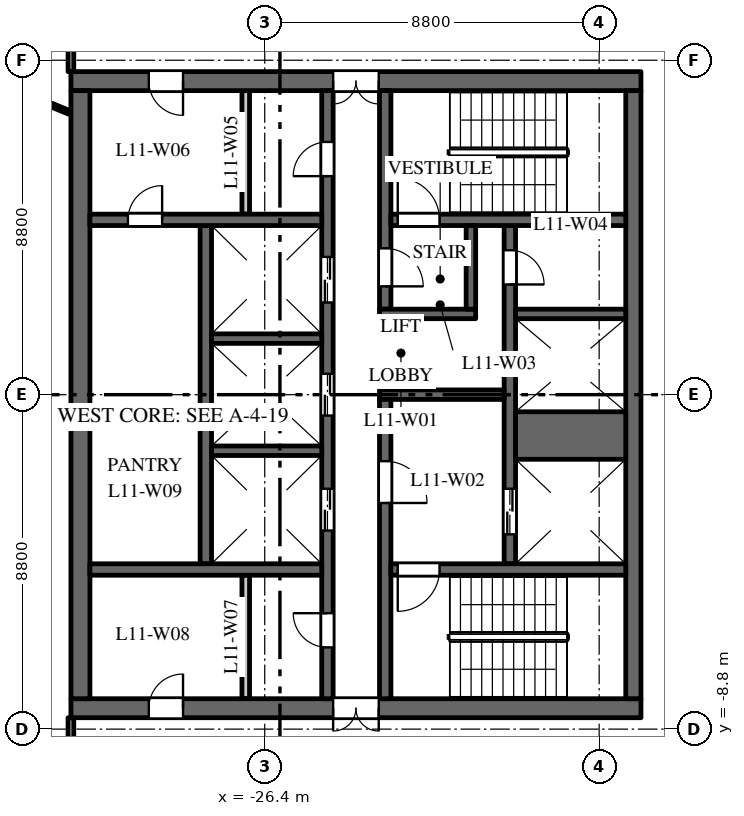
"""IFC4 building model, lengths in metres.
Left out: names, types, materials, properties, quantities, classifications, styles, units other than length and angle.
Written with IfcOpenShell. Run it as: python <this file> out.ifc"""

import sys

from ifc_helpers import new_model, si_unit, direction, frame, frame_2d, origin, place, context, subcontext, project, spatial, rectangle, extrude, element, fill, save


model = new_model("IFC4")
c1 = context("Model", 3, precision=1e-05, world=origin(), true_north=direction((0.0, 1.0)))
c2 = subcontext(c1, "Body", "Model", "MODEL_VIEW")
j1 = project(units=[si_unit("LENGTHUNIT", "METRE"), si_unit("PLANEANGLEUNIT", "RADIAN")], contexts=[c1])
p1 = place(None, origin())
s1 = spatial("IfcSite", under=j1, at=p1, CompositionType="ELEMENT")
p2 = place(p1, origin())
s2 = spatial("IfcBuilding", under=s1, at=p2, CompositionType="ELEMENT")
p3 = place(p2, frame((0.0, 0.0, 54.5)))
s3 = spatial("IfcBuildingStorey", under=s2, at=p3, CompositionType="ELEMENT", Elevation=54.5)
p4 = place(p3, frame((-16.5, 8.25, 0.0), z_axis=(0.0, 0.0, 1.0), x_axis=(-1.0, 0.0, 0.0)))
e1 = element("IfcWall", 1, at=p4, inside=s3, PredefinedType="SHEAR", context=c2, shape_type="SweptSolid", body=[
    extrude(rectangle(XDim=15.0, YDim=0.5, at=frame_2d((7.5, 0.0))), origin(), (0.0, 0.0, 1.0), 3.7),
])
p5 = place(p4, frame((6.9, 0.0, 0.0)))
e2 = element("IfcOpeningElement", 2, at=p5, cuts=e1, PredefinedType="OPENING", context=c2, shape_type="SweptSolid", body=[
    extrude(rectangle(XDim=1.2, YDim=2.1, at=frame_2d((0.6, 1.05))), frame((0.0, 0.26, 0.0), z_axis=(0.0, -1.0, 0.0), x_axis=(1.0, 0.0, 0.0)), (0.0, 0.0, 1.0), 0.52),
])
p6 = place(p4, frame((12.05, 0.0, 0.0)))
e3 = element("IfcOpeningElement", 3, at=p6, cuts=e1, PredefinedType="OPENING", context=c2, shape_type="SweptSolid", body=[
    extrude(rectangle(XDim=0.9, YDim=2.1, at=frame_2d((0.45, 1.05))), frame((0.0, 0.26, 0.0), z_axis=(0.0, -1.0, 0.0), x_axis=(1.0, 0.0, 0.0)), (0.0, 0.0, 1.0), 0.52),
])
p7 = place(p3, frame((-16.5, -8.25, 0.0), z_axis=(0.0, 0.0, 1.0), x_axis=(-1.0, 0.0, 0.0)))
e4 = element("IfcWall", 4, at=p7, inside=s3, PredefinedType="SHEAR", context=c2, shape_type="SweptSolid", body=[
    extrude(rectangle(XDim=15.0, YDim=0.5, at=frame_2d((7.5, 0.0))), origin(), (0.0, 0.0, 1.0), 3.7),
])
p8 = place(p7, frame((6.9, 0.0, 0.0)))
e5 = element("IfcOpeningElement", 5, at=p8, cuts=e4, PredefinedType="OPENING", context=c2, shape_type="SweptSolid", body=[
    extrude(rectangle(XDim=1.2, YDim=2.1, at=frame_2d((0.6, 1.05))), frame((0.0, 0.26, 0.0), z_axis=(0.0, -1.0, 0.0), x_axis=(1.0, 0.0, 0.0)), (0.0, 0.0, 1.0), 0.52),
])
p9 = place(p7, frame((12.05, 0.0, 0.0)))
e6 = element("IfcOpeningElement", 6, at=p9, cuts=e4, PredefinedType="OPENING", context=c2, shape_type="SweptSolid", body=[
    extrude(rectangle(XDim=0.9, YDim=2.1, at=frame_2d((0.45, 1.05))), frame((0.0, 0.26, 0.0), z_axis=(0.0, -1.0, 0.0), x_axis=(1.0, 0.0, 0.0)), (0.0, 0.0, 1.0), 0.52),
])
p10 = place(p3, frame((-27.95, -4.45, 0.0), z_axis=(0.0, 0.0, 1.0), x_axis=(0.0, 1.0, 0.0)))
e7 = element("IfcWall", 7, at=p10, inside=s3, PredefinedType="SHEAR", context=c2, shape_type="SweptSolid", body=[
    extrude(rectangle(XDim=8.9, YDim=0.3, at=frame_2d((4.45, 0.0))), origin(), (0.0, 0.0, 1.0), 3.7),
])
p11 = place(p3, frame((-19.95, -4.45, 0.0), z_axis=(0.0, 0.0, 1.0), x_axis=(0.0, 1.0, 0.0)))
e8 = element("IfcWall", 8, at=p11, inside=s3, PredefinedType="SHEAR", context=c2, shape_type="SweptSolid", body=[
    extrude(rectangle(XDim=8.9, YDim=0.3, at=frame_2d((4.45, 0.0))), origin(), (0.0, 0.0, 1.0), 3.7),
])
p12 = place(p11, frame((0.775, 0.0, 0.0)))
e9 = element("IfcOpeningElement", 9, at=p12, cuts=e8, PredefinedType="OPENING", context=c2, shape_type="SweptSolid", body=[
    extrude(rectangle(XDim=1.2, YDim=2.1, at=frame_2d((0.6, 1.05))), frame((0.0, 0.16, 0.0), z_axis=(0.0, -1.0, 0.0), x_axis=(1.0, 0.0, 0.0)), (0.0, 0.0, 1.0), 0.32),
])
p13 = place(p11, frame((7.35, 0.0, 0.0)))
e10 = element("IfcOpeningElement", 10, at=p13, cuts=e8, PredefinedType="OPENING", context=c2, shape_type="SweptSolid", body=[
    extrude(rectangle(XDim=0.9, YDim=2.1, at=frame_2d((0.45, 1.05))), frame((0.0, 0.16, 0.0), z_axis=(0.0, -1.0, 0.0), x_axis=(1.0, 0.0, 0.0)), (0.0, 0.0, 1.0), 0.32),
])
p14 = place(p3, frame((-24.75, -8.0, 0.0), z_axis=(0.0, 0.0, 1.0), x_axis=(0.0, 1.0, 0.0)))
e11 = element("IfcWall", 11, at=p14, inside=s3, PredefinedType="SHEAR", context=c2, shape_type="SweptSolid", body=[
    extrude(rectangle(XDim=16.0, YDim=0.3, at=frame_2d((8.0, 0.0))), origin(), (0.0, 0.0, 1.0), 3.7),
])
p15 = place(p14, frame((4.425, 0.0, 0.0)))
e12 = element("IfcOpeningElement", 12, at=p15, cuts=e11, PredefinedType="OPENING", context=c2, shape_type="SweptSolid", body=[
    extrude(rectangle(XDim=1.1, YDim=2.1, at=frame_2d((0.55, 1.05))), frame((0.0, 0.16, 0.0), z_axis=(0.0, -1.0, 0.0), x_axis=(1.0, 0.0, 0.0)), (0.0, 0.0, 1.0), 0.32),
])
p16 = place(p14, frame((7.45, 0.0, 0.0)))
e13 = element("IfcOpeningElement", 13, at=p16, cuts=e11, PredefinedType="OPENING", context=c2, shape_type="SweptSolid", body=[
    extrude(rectangle(XDim=1.1, YDim=2.1, at=frame_2d((0.55, 1.05))), frame((0.0, 0.16, 0.0), z_axis=(0.0, -1.0, 0.0), x_axis=(1.0, 0.0, 0.0)), (0.0, 0.0, 1.0), 0.32),
])
p17 = place(p14, frame((10.425, 0.0, 0.0)))
e14 = element("IfcOpeningElement", 14, at=p17, cuts=e11, PredefinedType="OPENING", context=c2, shape_type="SweptSolid", body=[
    extrude(rectangle(XDim=1.2, YDim=2.1, at=frame_2d((0.6, 1.05))), frame((0.0, 0.16, 0.0), z_axis=(0.0, -1.0, 0.0), x_axis=(1.0, 0.0, 0.0)), (0.0, 0.0, 1.0), 0.32),
])
p18 = place(p14, frame((13.75, 0.0, 0.0)))
e15 = element("IfcOpeningElement", 15, at=p18, cuts=e11, PredefinedType="OPENING", context=c2, shape_type="SweptSolid", body=[
    extrude(rectangle(XDim=0.9, YDim=2.1, at=frame_2d((0.45, 1.05))), frame((0.0, 0.16, 0.0), z_axis=(0.0, -1.0, 0.0), x_axis=(1.0, 0.0, 0.0)), (0.0, 0.0, 1.0), 0.32),
])
p19 = place(p14, frame((1.35, 0.0, 0.0)))
e16 = element("IfcOpeningElement", 16, at=p19, cuts=e11, PredefinedType="OPENING", context=c2, shape_type="SweptSolid", body=[
    extrude(rectangle(XDim=0.9, YDim=2.1, at=frame_2d((0.45, 1.05))), frame((0.0, 0.16, 0.0), z_axis=(0.0, -1.0, 0.0), x_axis=(1.0, 0.0, 0.0)), (0.0, 0.0, 1.0), 0.32),
])
p20 = place(p3, frame((-20.1, 0.0, 0.0), z_axis=(0.0, 0.0, 1.0), x_axis=(-1.0, 0.0, 0.0)))
e17 = element("IfcWall", 17, at=p20, inside=s3, PredefinedType="SHEAR", context=c2, shape_type="SweptSolid", body=[
    extrude(rectangle(XDim=3.28, YDim=0.25, at=frame_2d((1.64, 0.0))), origin(), (0.0, 0.0, 1.0), 3.7),
])
p21 = place(p3, frame((-16.7, -8.0, 0.0), z_axis=(0.0, 0.0, 1.0), x_axis=(0.0, 1.0, 0.0)))
e18 = element("IfcWall", 18, at=p21, inside=s3, PredefinedType="SHEAR", context=c2, shape_type="SweptSolid", body=[
    extrude(rectangle(XDim=16.0, YDim=0.4, at=frame_2d((8.0, 0.0))), origin(), (0.0, 0.0, 1.0), 3.7),
])
p22 = place(p3, frame((-31.25, -8.0, 0.0), z_axis=(0.0, 0.0, 1.0), x_axis=(0.0, 1.0, 0.0)))
e19 = element("IfcWall", 19, at=p22, inside=s3, PredefinedType="SHEAR", context=c2, shape_type="SweptSolid", body=[
    extrude(rectangle(XDim=16.0, YDim=0.5, at=frame_2d((8.0, 0.0))), origin(), (0.0, 0.0, 1.0), 3.7),
])
p23 = place(p3, frame((-24.9, 4.6, 0.0), z_axis=(0.0, 0.0, 1.0), x_axis=(-1.0, 0.0, 0.0)))
e20 = element("IfcWall", 20, at=p23, inside=s3, PredefinedType="SHEAR", context=c2, shape_type="SweptSolid", body=[
    extrude(rectangle(XDim=6.1, YDim=0.3, at=frame_2d((3.05, 0.0))), origin(), (0.0, 0.0, 1.0), 3.7),
])
p24 = place(p23, frame((4.2, 0.0, 0.0)))
e21 = element("IfcOpeningElement", 21, at=p24, cuts=e20, PredefinedType="OPENING", context=c2, shape_type="SweptSolid", body=[
    extrude(rectangle(XDim=0.9, YDim=2.1, at=frame_2d((0.45, 1.05))), frame((0.0, 0.16, 0.0), z_axis=(0.0, -1.0, 0.0), x_axis=(1.0, 0.0, 0.0)), (0.0, 0.0, 1.0), 0.32),
])
for number, where, z_axis, x_axis in (
    (22, (-26.9, 4.75, 0.0), (0.0, 0.0, 1.0), (0.0, 1.0, 0.0)),
    (23, (-26.9, -8.0, 0.0), (0.0, 0.0, 1.0), (0.0, 1.0, 0.0)),
):
    element("IfcWall", number, at=place(p3, frame(where, z_axis=z_axis, x_axis=x_axis)), inside=s3, PredefinedType="PARTITIONING", context=c2, shape_type="SweptSolid", body=[
        extrude(rectangle(XDim=3.25, YDim=0.2, at=frame_2d((1.625, 0.0))), origin(), (0.0, 0.0, 1.0), 3.7),
    ])
p25 = place(p3, frame((-24.9, -4.6, 0.0), z_axis=(0.0, 0.0, 1.0), x_axis=(-1.0, 0.0, 0.0)))
e24 = element("IfcWall", 24, at=p25, inside=s3, PredefinedType="SHEAR", context=c2, shape_type="SweptSolid", body=[
    extrude(rectangle(XDim=6.1, YDim=0.3, at=frame_2d((3.05, 0.0))), origin(), (0.0, 0.0, 1.0), 3.7),
])
p26 = place(p3, frame((-16.9, -1.075, 0.0), z_axis=(0.0, 0.0, 1.0), x_axis=(-1.0, 0.0, 0.0)))
e25 = element("IfcWall", 25, at=p26, inside=s3, PredefinedType="SHEAR", context=c2, shape_type="SweptSolid", body=[
    extrude(rectangle(XDim=2.9, YDim=1.25, at=frame_2d((1.45, 0.0))), origin(), (0.0, 0.0, 1.0), 3.7),
])
for number, where, z_axis, x_axis in (
    (26, (-16.9, 2.125, 0.0), (0.0, 0.0, 1.0), (-1.0, 0.0, 0.0)),
    (27, (-24.9, -1.475, 0.0), (0.0, 0.0, 1.0), (-1.0, 0.0, 0.0)),
    (28, (-24.9, 1.475, 0.0), (0.0, 0.0, 1.0), (-1.0, 0.0, 0.0)),
):
    element("IfcWall", number, at=place(p3, frame(where, z_axis=z_axis, x_axis=x_axis)), inside=s3, PredefinedType="SHEAR", context=c2, shape_type="SweptSolid", body=[
        extrude(rectangle(XDim=2.9, YDim=0.25, at=frame_2d((1.45, 0.0))), origin(), (0.0, 0.0, 1.0), 3.7),
    ])
p27 = place(p3, frame((-23.23, 2.25, 0.0), z_axis=(0.0, 0.0, 1.0), x_axis=(0.0, 1.0, 0.0)))
e29 = element("IfcWall", 29, at=p27, inside=s3, PredefinedType="SHEAR", context=c2, shape_type="SweptSolid", body=[
    extrude(rectangle(XDim=5.75, YDim=0.3, at=frame_2d((2.875, 0.0))), origin(), (0.0, 0.0, 1.0), 3.7),
])
p28 = place(p27, frame((0.6, 0.0, 0.0)))
e30 = element("IfcOpeningElement", 30, at=p28, cuts=e29, PredefinedType="OPENING", context=c2, shape_type="SweptSolid", body=[
    extrude(rectangle(XDim=1.0, YDim=2.1, at=frame_2d((0.5, 1.05))), frame((0.0, 0.16, 0.0), z_axis=(0.0, -1.0, 0.0), x_axis=(1.0, 0.0, 0.0)), (0.0, 0.0, 1.0), 0.32),
])
p29 = place(p3, frame((-23.23, -8.0, 0.0), z_axis=(0.0, 0.0, 1.0), x_axis=(0.0, 1.0, 0.0)))
e31 = element("IfcWall", 31, at=p29, inside=s3, PredefinedType="SHEAR", context=c2, shape_type="SweptSolid", body=[
    extrude(rectangle(XDim=7.875, YDim=0.3, at=frame_2d((3.938, 0.0))), origin(), (0.0, 0.0, 1.0), 3.7),
])
p30 = place(p29, frame((5.15, 0.0, 0.0)))
e32 = element("IfcOpeningElement", 32, at=p30, cuts=e31, PredefinedType="OPENING", context=c2, shape_type="SweptSolid", body=[
    extrude(rectangle(XDim=1.1, YDim=2.1, at=frame_2d((0.55, 1.05))), frame((0.0, 0.16, 0.0), z_axis=(0.0, -1.0, 0.0), x_axis=(1.0, 0.0, 0.0)), (0.0, 0.0, 1.0), 0.32),
])
p31 = place(p3, frame((-16.9, 4.6, 0.0), z_axis=(0.0, 0.0, 1.0), x_axis=(-1.0, 0.0, 0.0)))
e33 = element("IfcWall", 33, at=p31, inside=s3, PredefinedType="SHEAR", context=c2, shape_type="SweptSolid", body=[
    extrude(rectangle(XDim=6.18, YDim=0.3, at=frame_2d((3.09, 0.0))), origin(), (0.0, 0.0, 1.0), 3.7),
])
p32 = place(p31, frame((4.9, 0.0, 0.0)))
e34 = element("IfcOpeningElement", 34, at=p32, cuts=e33, PredefinedType="OPENING", context=c2, shape_type="SweptSolid", body=[
    extrude(rectangle(XDim=1.1, YDim=2.1, at=frame_2d((0.55, 1.05))), frame((0.0, 0.16, 0.0), z_axis=(0.0, -1.0, 0.0), x_axis=(1.0, 0.0, 0.0)), (0.0, 0.0, 1.0), 0.32),
])
p33 = place(p3, frame((-16.9, -4.6, 0.0), z_axis=(0.0, 0.0, 1.0), x_axis=(-1.0, 0.0, 0.0)))
e35 = element("IfcWall", 35, at=p33, inside=s3, PredefinedType="SHEAR", context=c2, shape_type="SweptSolid", body=[
    extrude(rectangle(XDim=6.18, YDim=0.3, at=frame_2d((3.09, 0.0))), origin(), (0.0, 0.0, 1.0), 3.7),
])
p34 = place(p33, frame((4.9, 0.0, 0.0)))
e36 = element("IfcOpeningElement", 36, at=p34, cuts=e35, PredefinedType="OPENING", context=c2, shape_type="SweptSolid", body=[
    extrude(rectangle(XDim=1.1, YDim=2.1, at=frame_2d((0.55, 1.05))), frame((0.0, 0.16, 0.0), z_axis=(0.0, -1.0, 0.0), x_axis=(1.0, 0.0, 0.0)), (0.0, 0.0, 1.0), 0.32),
])
p35 = place(p3, frame((-20.85, 2.125, 0.0), z_axis=(0.0, 0.0, 1.0), x_axis=(-1.0, 0.0, 0.0)))
e37 = element("IfcWall", 37, at=p35, inside=s3, PredefinedType="SHEAR", context=c2, shape_type="SweptSolid", body=[
    extrude(rectangle(XDim=2.53, YDim=0.25, at=frame_2d((1.265, 0.0))), origin(), (0.0, 0.0, 1.0), 3.7),
])
p36 = place(p3, frame((-20.975, 2.25, 0.0), z_axis=(0.0, 0.0, 1.0), x_axis=(0.0, 1.0, 0.0)))
e38 = element("IfcWall", 38, at=p36, inside=s3, PredefinedType="SHEAR", context=c2, shape_type="SweptSolid", body=[
    extrude(rectangle(XDim=2.2, YDim=0.25, at=frame_2d((1.1, 0.0))), origin(), (0.0, 0.0, 1.0), 3.7),
])
p37 = place(p3, frame((-34.234, 8.53, 0.0), z_axis=(0.0, 0.0, 1.0), x_axis=(0.925344112436, -0.379128307542, 0.0)))
e39 = element("IfcWall", 39, at=p37, inside=s3, PredefinedType="PARTITIONING", context=c2, shape_type="SweptSolid", body=[
    extrude(rectangle(XDim=2.954, YDim=0.1, at=frame_2d((1.477, 0.0))), origin(), (0.0, 0.0, 1.0), 2.85),
])
for number, where, z_axis, x_axis in (
    (40, (-31.5, -10.7, 0.0), (0.0, 0.0, 1.0), (0.0, 1.0, 0.0)),
    (41, (-31.5, 8.5, 0.0), (0.0, 0.0, 1.0), (0.0, 1.0, 0.0)),
):
    element("IfcWall", number, at=place(p3, frame(where, z_axis=z_axis, x_axis=x_axis)), inside=s3, PredefinedType="PARTITIONING", context=c2, shape_type="SweptSolid", body=[
        extrude(rectangle(XDim=2.2, YDim=0.15, at=frame_2d((1.1, 0.0))), origin(), (0.0, 0.0, 1.0), 3.7),
    ])
p38 = place(p12, origin())
e42 = element("IfcDoor", 42, at=p38, inside=s3, OperationType="DOUBLE_DOOR_SLIDING", PredefinedType="DOOR", context=c2, shape_type="SweptSolid", body=[
    extrude(rectangle(XDim=1.2, YDim=2.1, at=frame_2d((0.6, 1.05))), frame((0.0, 0.025, 0.0), z_axis=(0.0, -1.0, 0.0), x_axis=(1.0, 0.0, 0.0)), (0.0, 0.0, 1.0), 0.05),
])
fill(e9, e42)
p39 = place(p15, origin())
e43 = element("IfcDoor", 43, at=p39, inside=s3, OperationType="DOUBLE_DOOR_SLIDING", PredefinedType="DOOR", context=c2, shape_type="SweptSolid", body=[
    extrude(rectangle(XDim=1.1, YDim=2.1, at=frame_2d((0.55, 1.05))), frame((0.0, 0.025, 0.0), z_axis=(0.0, -1.0, 0.0), x_axis=(1.0, 0.0, 0.0)), (0.0, 0.0, 1.0), 0.05),
])
fill(e12, e43)
p40 = place(p16, origin())
e44 = element("IfcDoor", 44, at=p40, inside=s3, OperationType="DOUBLE_DOOR_SLIDING", PredefinedType="DOOR", context=c2, shape_type="SweptSolid", body=[
    extrude(rectangle(XDim=1.1, YDim=2.1, at=frame_2d((0.55, 1.05))), frame((0.0, 0.025, 0.0), z_axis=(0.0, -1.0, 0.0), x_axis=(1.0, 0.0, 0.0)), (0.0, 0.0, 1.0), 0.05),
])
fill(e13, e44)
p41 = place(p17, origin())
e45 = element("IfcDoor", 45, at=p41, inside=s3, OperationType="DOUBLE_DOOR_SLIDING", PredefinedType="DOOR", context=c2, shape_type="SweptSolid", body=[
    extrude(rectangle(XDim=1.2, YDim=2.1, at=frame_2d((0.6, 1.05))), frame((0.0, 0.025, 0.0), z_axis=(0.0, -1.0, 0.0), x_axis=(1.0, 0.0, 0.0)), (0.0, 0.0, 1.0), 0.05),
])
fill(e14, e45)
p42 = place(p32, origin())
e46 = element("IfcDoor", 46, at=p42, inside=s3, OperationType="SINGLE_SWING_RIGHT", PredefinedType="DOOR", context=c2, shape_type="SweptSolid", body=[
    extrude(rectangle(XDim=1.1, YDim=2.1, at=frame_2d((0.55, 1.05))), frame((0.0, 0.025, 0.0), z_axis=(0.0, -1.0, 0.0), x_axis=(1.0, 0.0, 0.0)), (0.0, 0.0, 1.0), 0.05),
])
fill(e34, e46)
p43 = place(p34, origin())
e47 = element("IfcDoor", 47, at=p43, inside=s3, OperationType="SINGLE_SWING_LEFT", PredefinedType="DOOR", context=c2, shape_type="SweptSolid", body=[
    extrude(rectangle(XDim=1.1, YDim=2.1, at=frame_2d((0.55, 1.05))), frame((0.0, 0.025, 0.0), z_axis=(0.0, -1.0, 0.0), x_axis=(1.0, 0.0, 0.0)), (0.0, 0.0, 1.0), 0.05),
])
fill(e36, e47)
p44 = place(p30, origin())
e48 = element("IfcDoor", 48, at=p44, inside=s3, OperationType="SINGLE_SWING_LEFT", PredefinedType="DOOR", context=c2, shape_type="SweptSolid", body=[
    extrude(rectangle(XDim=1.1, YDim=2.1, at=frame_2d((0.55, 1.05))), frame((0.0, 0.025, 0.0), z_axis=(0.0, -1.0, 0.0), x_axis=(1.0, 0.0, 0.0)), (0.0, 0.0, 1.0), 0.05),
])
fill(e32, e48)
p45 = place(p28, origin())
e49 = element("IfcDoor", 49, at=p45, inside=s3, OperationType="SINGLE_SWING_LEFT", PredefinedType="DOOR", context=c2, shape_type="SweptSolid", body=[
    extrude(rectangle(XDim=1.0, YDim=2.1, at=frame_2d((0.5, 1.05))), frame((0.0, 0.025, 0.0), z_axis=(0.0, -1.0, 0.0), x_axis=(1.0, 0.0, 0.0)), (0.0, 0.0, 1.0), 0.05),
])
fill(e30, e49)
p46 = place(p5, origin())
e50 = element("IfcDoor", 50, at=p46, inside=s3, OperationType="DOUBLE_DOOR_DOUBLE_SWING", PredefinedType="DOOR", context=c2, shape_type="SweptSolid", body=[
    extrude(rectangle(XDim=1.2, YDim=2.1, at=frame_2d((0.6, 1.05))), frame((0.0, 0.025, 0.0), z_axis=(0.0, -1.0, 0.0), x_axis=(1.0, 0.0, 0.0)), (0.0, 0.0, 1.0), 0.05),
])
fill(e2, e50)
p47 = place(p8, origin())
e51 = element("IfcDoor", 51, at=p47, inside=s3, OperationType="DOUBLE_DOOR_DOUBLE_SWING", PredefinedType="DOOR", context=c2, shape_type="SweptSolid", body=[
    extrude(rectangle(XDim=1.2, YDim=2.1, at=frame_2d((0.6, 1.05))), frame((0.0, 0.025, 0.0), z_axis=(0.0, -1.0, 0.0), x_axis=(1.0, 0.0, 0.0)), (0.0, 0.0, 1.0), 0.05),
])
fill(e5, e51)
p48 = place(p13, origin())
e52 = element("IfcDoor", 52, at=p48, inside=s3, OperationType="SINGLE_SWING_LEFT", PredefinedType="DOOR", context=c2, shape_type="SweptSolid", body=[
    extrude(rectangle(XDim=0.9, YDim=2.1, at=frame_2d((0.45, 1.05))), frame((0.0, 0.025, 0.0), z_axis=(0.0, -1.0, 0.0), x_axis=(1.0, 0.0, 0.0)), (0.0, 0.0, 1.0), 0.05),
])
fill(e10, e52)
p49 = place(p18, origin())
e53 = element("IfcDoor", 53, at=p49, inside=s3, OperationType="SINGLE_SWING_RIGHT", PredefinedType="DOOR", context=c2, shape_type="SweptSolid", body=[
    extrude(rectangle(XDim=0.9, YDim=2.1, at=frame_2d((0.45, 1.05))), frame((0.0, 0.025, 0.0), z_axis=(0.0, -1.0, 0.0), x_axis=(1.0, 0.0, 0.0)), (0.0, 0.0, 1.0), 0.05),
])
fill(e15, e53)
p50 = place(p6, origin())
e54 = element("IfcDoor", 54, at=p50, inside=s3, OperationType="SINGLE_SWING_RIGHT", PredefinedType="DOOR", context=c2, shape_type="SweptSolid", body=[
    extrude(rectangle(XDim=0.9, YDim=2.1, at=frame_2d((0.45, 1.05))), frame((0.0, 0.025, 0.0), z_axis=(0.0, -1.0, 0.0), x_axis=(1.0, 0.0, 0.0)), (0.0, 0.0, 1.0), 0.05),
])
fill(e3, e54)
p51 = place(p19, origin())
e55 = element("IfcDoor", 55, at=p51, inside=s3, OperationType="SINGLE_SWING_LEFT", PredefinedType="DOOR", context=c2, shape_type="SweptSolid", body=[
    extrude(rectangle(XDim=0.9, YDim=2.1, at=frame_2d((0.45, 1.05))), frame((0.0, 0.025, 0.0), z_axis=(0.0, -1.0, 0.0), x_axis=(1.0, 0.0, 0.0)), (0.0, 0.0, 1.0), 0.05),
])
fill(e16, e55)
p52 = place(p9, origin())
e56 = element("IfcDoor", 56, at=p52, inside=s3, OperationType="SINGLE_SWING_LEFT", PredefinedType="DOOR", context=c2, shape_type="SweptSolid", body=[
    extrude(rectangle(XDim=0.9, YDim=2.1, at=frame_2d((0.45, 1.05))), frame((0.0, 0.025, 0.0), z_axis=(0.0, -1.0, 0.0), x_axis=(1.0, 0.0, 0.0)), (0.0, 0.0, 1.0), 0.05),
])
fill(e6, e56)
p53 = place(p24, origin())
e57 = element("IfcDoor", 57, at=p53, inside=s3, OperationType="SINGLE_SWING_LEFT", PredefinedType="DOOR", context=c2, shape_type="SweptSolid", body=[
    extrude(rectangle(XDim=0.9, YDim=2.1, at=frame_2d((0.45, 1.05))), frame((0.0, 0.025, 0.0), z_axis=(0.0, -1.0, 0.0), x_axis=(1.0, 0.0, 0.0)), (0.0, 0.0, 1.0), 0.05),
])
fill(e21, e57)
save(model, sys.argv[1])
